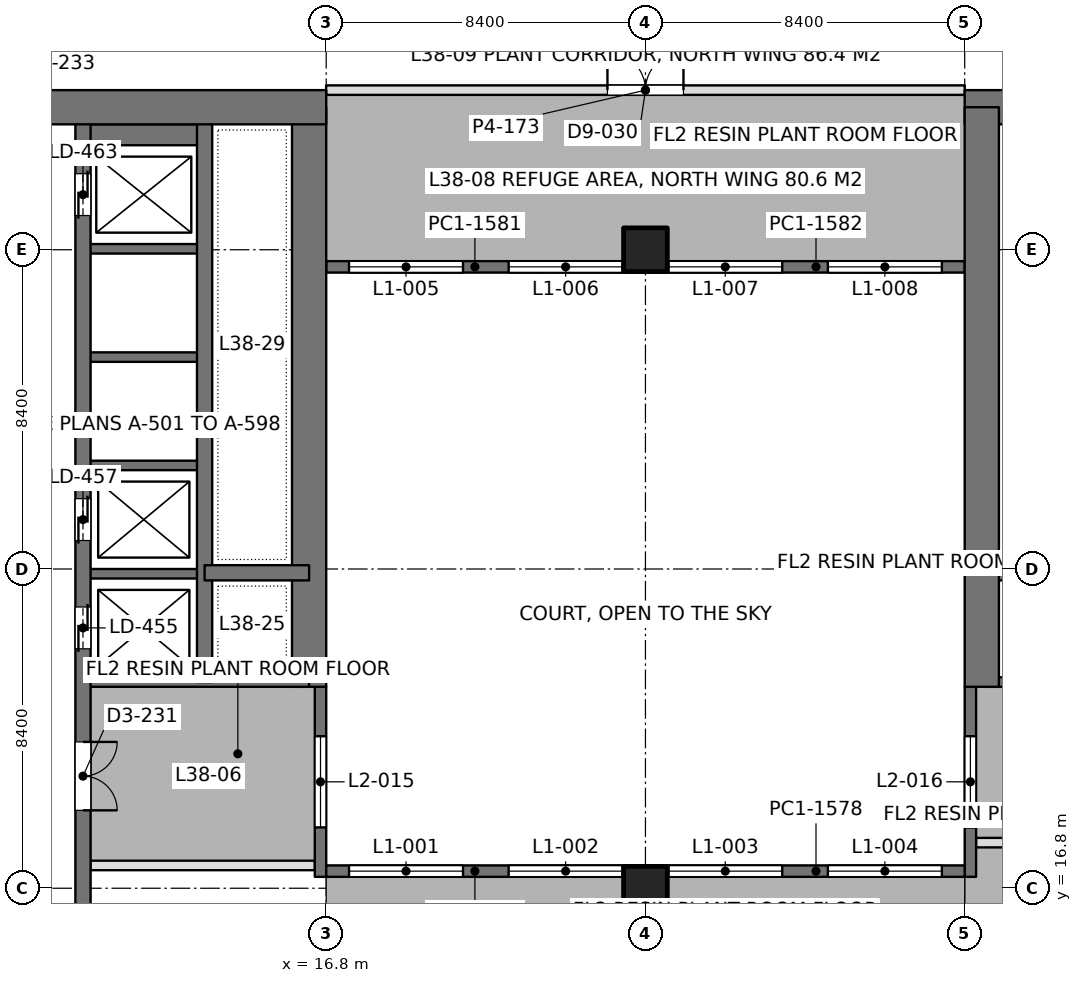
"""IFC4 building model, lengths in metres.
Left out: names, types, materials, properties, quantities, classifications, styles, units other than length and angle.
Written with IfcOpenShell. Run it as: python <this file> out.ifc"""

import sys

from ifc_helpers import new_model, si_unit, direction, frame, frame_2d, origin, origin_2d, place, context, subcontext, project, spatial, rectangle, extrude, element, fill, save


model = new_model("IFC4")
c1 = context("Model", 3, precision=1e-05, world=origin(), true_north=direction((0.0, 1.0)))
c2 = subcontext(c1, "Body", "Model", "MODEL_VIEW")
j1 = project(units=[si_unit("LENGTHUNIT", "METRE"), si_unit("PLANEANGLEUNIT", "RADIAN")], contexts=[c1])
p1 = place(None, origin())
s1 = spatial("IfcSite", under=j1, at=p1, CompositionType="ELEMENT")
p2 = place(p1, origin())
s2 = spatial("IfcBuilding", under=s1, at=p2, CompositionType="ELEMENT")
p3 = place(p2, frame((0.0, 0.0, 168.0)))
s3 = spatial("IfcBuildingStorey", under=s2, at=p3, CompositionType="ELEMENT", Elevation=168.0)
for number, where, z_axis, x_axis in (
    (1, (25.2, 16.8, 0.0), (0.0, 0.0, 1.0), (1.0, 0.0, 0.0)),
    (2, (25.2, 33.6, 0.0), (0.0, 0.0, 1.0), (1.0, 0.0, 0.0)),
):
    element("IfcColumn", number, at=place(p3, frame(where, z_axis=z_axis, x_axis=x_axis)), inside=s3, PredefinedType="COLUMN", context=c2, shape_type="SweptSolid", body=[
        extrude(rectangle(XDim=1.15, YDim=1.15, at=origin_2d()), origin(), (0.0, 0.0, 1.0), 5.4),
    ])
p4 = place(p3, frame((-1.2, 37.35, 0.0), z_axis=(0.0, 0.0, 1.0), x_axis=(1.0, 0.0, 0.0)))
e3 = element("IfcWall", 3, at=p4, inside=s3, PredefinedType="SHEAR", context=c2, shape_type="SweptSolid", body=[
    extrude(rectangle(XDim=18.0, YDim=0.9, at=frame_2d((9.0, 0.0))), origin(), (0.0, 0.0, 1.0), 5.4),
])
p5 = place(p4, frame((8.95, 0.0, 0.0)))
e4 = element("IfcOpeningElement", 4, at=p5, cuts=e3, PredefinedType="OPENING", context=c2, shape_type="SweptSolid", body=[
    extrude(rectangle(XDim=1.8, YDim=2.4, at=frame_2d((0.9, 1.2))), frame((0.0, 0.46, 0.0), z_axis=(0.0, -1.0, 0.0), x_axis=(1.0, 0.0, 0.0)), (0.0, 0.0, 1.0), 0.92),
])
p6 = place(p3, frame((16.35, 22.1, 0.0), z_axis=(0.0, 0.0, 1.0), x_axis=(0.0, 1.0, 0.0)))
e5 = element("IfcWall", 5, at=p6, inside=s3, PredefinedType="SHEAR", context=c2, shape_type="SweptSolid", body=[
    extrude(rectangle(XDim=15.25, YDim=0.9, at=frame_2d((7.625, 0.0))), origin(), (0.0, 0.0, 1.0), 5.4),
])
p7 = place(p3, frame((10.4, 13.05, 0.0), z_axis=(0.0, 0.0, 1.0), x_axis=(0.0, 1.0, 0.0)))
e6 = element("IfcWall", 6, at=p7, inside=s3, PredefinedType="SHEAR", context=c2, shape_type="SweptSolid", body=[
    extrude(rectangle(XDim=24.3, YDim=0.4, at=frame_2d((12.15, 0.0))), origin(), (0.0, 0.0, 1.0), 5.4),
])
p8 = place(p7, frame((10.05, 0.0, 0.0)))
e7 = element("IfcOpeningElement", 7, at=p8, cuts=e6, PredefinedType="OPENING", context=c2, shape_type="SweptSolid", body=[
    extrude(rectangle(XDim=1.1, YDim=2.2, at=frame_2d((0.55, 1.1))), frame((0.0, 0.21, 0.0), z_axis=(0.0, -1.0, 0.0), x_axis=(1.0, 0.0, 0.0)), (0.0, 0.0, 1.0), 0.42),
])
p9 = place(p7, frame((12.9, 0.0, 0.0)))
e8 = element("IfcOpeningElement", 8, at=p9, cuts=e6, PredefinedType="OPENING", context=c2, shape_type="SweptSolid", body=[
    extrude(rectangle(XDim=1.1, YDim=2.2, at=frame_2d((0.55, 1.1))), frame((0.0, 0.21, 0.0), z_axis=(0.0, -1.0, 0.0), x_axis=(1.0, 0.0, 0.0)), (0.0, 0.0, 1.0), 0.42),
])
p10 = place(p7, frame((21.45, 0.0, 0.0)))
e9 = element("IfcOpeningElement", 9, at=p10, cuts=e6, PredefinedType="OPENING", context=c2, shape_type="SweptSolid", body=[
    extrude(rectangle(XDim=1.1, YDim=2.2, at=frame_2d((0.55, 1.1))), frame((0.0, 0.21, 0.0), z_axis=(0.0, -1.0, 0.0), x_axis=(1.0, 0.0, 0.0)), (0.0, 0.0, 1.0), 0.42),
])
p11 = place(p7, frame((5.8, 0.0, 0.0)))
e10 = element("IfcOpeningElement", 10, at=p11, cuts=e6, PredefinedType="OPENING", context=c2, shape_type="SweptSolid", body=[
    extrude(rectangle(XDim=1.8, YDim=2.4, at=frame_2d((0.9, 1.2))), frame((0.0, 0.21, 0.0), z_axis=(0.0, -1.0, 0.0), x_axis=(1.0, 0.0, 0.0)), (0.0, 0.0, 1.0), 0.42),
])
p12 = place(p7, frame((1.05, 0.0, 0.0)))
e11 = element("IfcOpeningElement", 11, at=p12, cuts=e6, PredefinedType="OPENING", context=c2, shape_type="SweptSolid", body=[
    extrude(rectangle(XDim=1.8, YDim=2.4, at=frame_2d((0.9, 1.2))), frame((0.0, 0.21, 0.0), z_axis=(0.0, -1.0, 0.0), x_axis=(1.0, 0.0, 0.0)), (0.0, 0.0, 1.0), 0.42),
])
p13 = place(p3, frame((13.6, 22.225, 0.0), z_axis=(0.0, 0.0, 1.0), x_axis=(0.0, 1.0, 0.0)))
e12 = element("IfcWall", 12, at=p13, inside=s3, PredefinedType="SHEAR", context=c2, shape_type="SweptSolid", body=[
    extrude(rectangle(XDim=15.125, YDim=0.4, at=frame_2d((7.562, 0.0))), origin(), (0.0, 0.0, 1.0), 5.4),
])
p14 = place(p3, frame((13.6, 25.1, 0.0), z_axis=(0.0, 0.0, 1.0), x_axis=(1.0, 0.0, 0.0)))
e13 = element("IfcWall", 13, at=p14, inside=s3, PredefinedType="SHEAR", context=c2, shape_type="SweptSolid", body=[
    extrude(rectangle(XDim=2.75, YDim=0.4, at=frame_2d((1.375, 0.0))), origin(), (0.0, 0.0, 1.0), 5.4),
])
p15 = place(p3, frame((10.4, 22.225, 0.0), z_axis=(0.0, 0.0, 1.0), x_axis=(1.0, 0.0, 0.0)))
e14 = element("IfcWall", 14, at=p15, inside=s3, PredefinedType="SHEAR", context=c2, shape_type="SweptSolid", body=[
    extrude(rectangle(XDim=5.95, YDim=0.25, at=frame_2d((2.975, 0.0))), origin(), (0.0, 0.0, 1.0), 5.4),
])
for number, where, z_axis, x_axis in (
    (15, (10.4, 25.075, 0.0), (0.0, 0.0, 1.0), (1.0, 0.0, 0.0)),
    (16, (10.4, 27.925, 0.0), (0.0, 0.0, 1.0), (1.0, 0.0, 0.0)),
    (17, (10.4, 30.775, 0.0), (0.0, 0.0, 1.0), (1.0, 0.0, 0.0)),
    (18, (10.4, 33.625, 0.0), (0.0, 0.0, 1.0), (1.0, 0.0, 0.0)),
):
    element("IfcWall", number, at=place(p3, frame(where, z_axis=z_axis, x_axis=x_axis)), inside=s3, PredefinedType="SHEAR", context=c2, shape_type="SweptSolid", body=[
        extrude(rectangle(XDim=3.2, YDim=0.25, at=frame_2d((1.6, 0.0))), origin(), (0.0, 0.0, 1.0), 5.4),
    ])
p16 = place(p3, frame((10.4, 36.625, 0.0), z_axis=(0.0, 0.0, 1.0), x_axis=(1.0, 0.0, 0.0)))
e19 = element("IfcWall", 19, at=p16, inside=s3, PredefinedType="SHEAR", context=c2, shape_type="SweptSolid", body=[
    extrude(rectangle(XDim=3.2, YDim=0.55, at=frame_2d((1.6, 0.0))), origin(), (0.0, 0.0, 1.0), 5.4),
])
p17 = place(p3, frame((33.6, 37.35, 0.0), z_axis=(0.0, 0.0, 1.0), x_axis=(1.0, 0.0, 0.0)))
e20 = element("IfcWall", 20, at=p17, inside=s3, PredefinedType="SHEAR", context=c2, shape_type="SweptSolid", body=[
    extrude(rectangle(XDim=18.0, YDim=0.9, at=frame_2d((9.0, 0.0))), origin(), (0.0, 0.0, 1.0), 5.4),
])
p18 = place(p17, frame((7.25, 0.0, 0.0)))
e21 = element("IfcOpeningElement", 21, at=p18, cuts=e20, PredefinedType="OPENING", context=c2, shape_type="SweptSolid", body=[
    extrude(rectangle(XDim=1.8, YDim=2.4, at=frame_2d((0.9, 1.2))), frame((0.0, 0.46, 0.0), z_axis=(0.0, -1.0, 0.0), x_axis=(1.0, 0.0, 0.0)), (0.0, 0.0, 1.0), 0.92),
])
p19 = place(p3, frame((34.05, 22.1, 0.0), z_axis=(0.0, 0.0, 1.0), x_axis=(0.0, 1.0, 0.0)))
e22 = element("IfcWall", 22, at=p19, inside=s3, PredefinedType="SHEAR", context=c2, shape_type="SweptSolid", body=[
    extrude(rectangle(XDim=15.25, YDim=0.9, at=frame_2d((7.625, 0.0))), origin(), (0.0, 0.0, 1.0), 5.4),
])
p20 = place(p3, frame((36.8, 25.1, 0.0), z_axis=(0.0, 0.0, 1.0), x_axis=(-1.0, 0.0, 0.0)))
e23 = element("IfcWall", 23, at=p20, inside=s3, PredefinedType="SHEAR", context=c2, shape_type="SweptSolid", body=[
    extrude(rectangle(XDim=2.75, YDim=0.4, at=frame_2d((1.375, 0.0))), origin(), (0.0, 0.0, 1.0), 5.4),
])
p21 = place(p3, frame((40.0, 22.225, 0.0), z_axis=(0.0, 0.0, 1.0), x_axis=(-1.0, 0.0, 0.0)))
e24 = element("IfcWall", 24, at=p21, inside=s3, PredefinedType="SHEAR", context=c2, shape_type="SweptSolid", body=[
    extrude(rectangle(XDim=5.95, YDim=0.25, at=frame_2d((2.975, 0.0))), origin(), (0.0, 0.0, 1.0), 5.4),
])
p22 = place(p3, frame((16.65, 17.1, 0.0), z_axis=(0.0, 0.0, 1.0), x_axis=(0.0, 1.0, 0.0)))
e25 = element("IfcWall", 25, at=p22, inside=s3, PredefinedType="SOLIDWALL", context=c2, shape_type="SweptSolid", body=[
    extrude(rectangle(XDim=5.0, YDim=0.3, at=frame_2d((2.5, 0.0))), origin(), (0.0, 0.0, 1.0), 5.25),
])
p23 = place(p22, frame((1.3, 0.0, 1.2)))
e26 = element("IfcOpeningElement", 26, at=p23, cuts=e25, PredefinedType="OPENING", context=c2, shape_type="SweptSolid", body=[
    extrude(rectangle(XDim=2.4, YDim=2.4, at=frame_2d((1.2, 1.2))), frame((0.0, 0.16, 0.0), z_axis=(0.0, -1.0, 0.0), x_axis=(1.0, 0.0, 0.0)), (0.0, 0.0, 1.0), 0.32),
])
p24 = place(p3, frame((33.75, 17.1, 0.0), z_axis=(0.0, 0.0, 1.0), x_axis=(0.0, 1.0, 0.0)))
e27 = element("IfcWall", 27, at=p24, inside=s3, PredefinedType="SOLIDWALL", context=c2, shape_type="SweptSolid", body=[
    extrude(rectangle(XDim=5.0, YDim=0.3, at=frame_2d((2.5, 0.0))), origin(), (0.0, 0.0, 1.0), 5.25),
])
p25 = place(p24, frame((1.3, 0.0, 1.2)))
e28 = element("IfcOpeningElement", 28, at=p25, cuts=e27, PredefinedType="OPENING", context=c2, shape_type="SweptSolid", body=[
    extrude(rectangle(XDim=2.4, YDim=2.4, at=frame_2d((1.2, 1.2))), frame((0.0, 0.16, 0.0), z_axis=(0.0, -1.0, 0.0), x_axis=(1.0, 0.0, 0.0)), (0.0, 0.0, 1.0), 0.32),
])
p26 = place(p3, frame((16.8, 17.25, 0.0), z_axis=(0.0, 0.0, 1.0), x_axis=(1.0, 0.0, 0.0)))
e29 = element("IfcWall", 29, at=p26, inside=s3, PredefinedType="SOLIDWALL", context=c2, shape_type="SweptSolid", body=[
    extrude(rectangle(XDim=7.825, YDim=0.3, at=frame_2d((3.913, 0.0))), origin(), (0.0, 0.0, 1.0), 5.25),
])
p27 = place(p26, frame((0.6, 0.0, 1.2)))
e30 = element("IfcOpeningElement", 30, at=p27, cuts=e29, PredefinedType="OPENING", context=c2, shape_type="SweptSolid", body=[
    extrude(rectangle(XDim=3.0, YDim=2.4, at=frame_2d((1.5, 1.2))), frame((0.0, 0.16, 0.0), z_axis=(0.0, -1.0, 0.0), x_axis=(1.0, 0.0, 0.0)), (0.0, 0.0, 1.0), 0.32),
])
p28 = place(p26, frame((4.8, 0.0, 1.2)))
e31 = element("IfcOpeningElement", 31, at=p28, cuts=e29, PredefinedType="OPENING", context=c2, shape_type="SweptSolid", body=[
    extrude(rectangle(XDim=3.0, YDim=2.4, at=frame_2d((1.5, 1.2))), frame((0.0, 0.16, 0.0), z_axis=(0.0, -1.0, 0.0), x_axis=(1.0, 0.0, 0.0)), (0.0, 0.0, 1.0), 0.32),
])
p29 = place(p3, frame((25.775, 17.25, 0.0), z_axis=(0.0, 0.0, 1.0), x_axis=(1.0, 0.0, 0.0)))
e32 = element("IfcWall", 32, at=p29, inside=s3, PredefinedType="SOLIDWALL", context=c2, shape_type="SweptSolid", body=[
    extrude(rectangle(XDim=7.825, YDim=0.3, at=frame_2d((3.913, 0.0))), origin(), (0.0, 0.0, 1.0), 5.25),
])
p30 = place(p29, frame((0.025, 0.0, 1.2)))
e33 = element("IfcOpeningElement", 33, at=p30, cuts=e32, PredefinedType="OPENING", context=c2, shape_type="SweptSolid", body=[
    extrude(rectangle(XDim=3.0, YDim=2.4, at=frame_2d((1.5, 1.2))), frame((0.0, 0.16, 0.0), z_axis=(0.0, -1.0, 0.0), x_axis=(1.0, 0.0, 0.0)), (0.0, 0.0, 1.0), 0.32),
])
p31 = place(p29, frame((4.225, 0.0, 1.2)))
e34 = element("IfcOpeningElement", 34, at=p31, cuts=e32, PredefinedType="OPENING", context=c2, shape_type="SweptSolid", body=[
    extrude(rectangle(XDim=3.0, YDim=2.4, at=frame_2d((1.5, 1.2))), frame((0.0, 0.16, 0.0), z_axis=(0.0, -1.0, 0.0), x_axis=(1.0, 0.0, 0.0)), (0.0, 0.0, 1.0), 0.32),
])
p32 = place(p3, frame((16.8, 33.15, 0.0), z_axis=(0.0, 0.0, 1.0), x_axis=(1.0, 0.0, 0.0)))
e35 = element("IfcWall", 35, at=p32, inside=s3, PredefinedType="SOLIDWALL", context=c2, shape_type="SweptSolid", body=[
    extrude(rectangle(XDim=7.825, YDim=0.3, at=frame_2d((3.913, 0.0))), origin(), (0.0, 0.0, 1.0), 5.25),
])
p33 = place(p32, frame((0.6, 0.0, 1.2)))
e36 = element("IfcOpeningElement", 36, at=p33, cuts=e35, PredefinedType="OPENING", context=c2, shape_type="SweptSolid", body=[
    extrude(rectangle(XDim=3.0, YDim=2.4, at=frame_2d((1.5, 1.2))), frame((0.0, 0.16, 0.0), z_axis=(0.0, -1.0, 0.0), x_axis=(1.0, 0.0, 0.0)), (0.0, 0.0, 1.0), 0.32),
])
p34 = place(p32, frame((4.8, 0.0, 1.2)))
e37 = element("IfcOpeningElement", 37, at=p34, cuts=e35, PredefinedType="OPENING", context=c2, shape_type="SweptSolid", body=[
    extrude(rectangle(XDim=3.0, YDim=2.4, at=frame_2d((1.5, 1.2))), frame((0.0, 0.16, 0.0), z_axis=(0.0, -1.0, 0.0), x_axis=(1.0, 0.0, 0.0)), (0.0, 0.0, 1.0), 0.32),
])
p35 = place(p3, frame((25.775, 33.15, 0.0), z_axis=(0.0, 0.0, 1.0), x_axis=(1.0, 0.0, 0.0)))
e38 = element("IfcWall", 38, at=p35, inside=s3, PredefinedType="SOLIDWALL", context=c2, shape_type="SweptSolid", body=[
    extrude(rectangle(XDim=7.825, YDim=0.3, at=frame_2d((3.913, 0.0))), origin(), (0.0, 0.0, 1.0), 5.25),
])
p36 = place(p35, frame((0.025, 0.0, 1.2)))
e39 = element("IfcOpeningElement", 39, at=p36, cuts=e38, PredefinedType="OPENING", context=c2, shape_type="SweptSolid", body=[
    extrude(rectangle(XDim=3.0, YDim=2.4, at=frame_2d((1.5, 1.2))), frame((0.0, 0.16, 0.0), z_axis=(0.0, -1.0, 0.0), x_axis=(1.0, 0.0, 0.0)), (0.0, 0.0, 1.0), 0.32),
])
p37 = place(p35, frame((4.225, 0.0, 1.2)))
e40 = element("IfcOpeningElement", 40, at=p37, cuts=e38, PredefinedType="OPENING", context=c2, shape_type="SweptSolid", body=[
    extrude(rectangle(XDim=3.0, YDim=2.4, at=frame_2d((1.5, 1.2))), frame((0.0, 0.16, 0.0), z_axis=(0.0, -1.0, 0.0), x_axis=(1.0, 0.0, 0.0)), (0.0, 0.0, 1.0), 0.32),
])
for number, where, z_axis, x_axis in (
    (41, (10.598, 17.4, 0.0), (0.0, 0.0, 1.0), (1.0, 0.0, 0.0)),
    (42, (33.898, 18.0, 0.0), (0.0, 0.0, 1.0), (1.0, 0.0, 0.0)),
):
    element("IfcWall", number, at=place(p3, frame(where, z_axis=z_axis, x_axis=x_axis)), inside=s3, PredefinedType="PARTITIONING", context=c2, shape_type="SweptSolid", body=[
        extrude(rectangle(XDim=5.904, YDim=0.25, at=frame_2d((2.952, 0.0))), origin(), (0.0, 0.0, 1.0), 4.75),
    ])
p38 = place(p3, frame((16.798, 37.8, 0.0), z_axis=(0.0, 0.0, 1.0), x_axis=(1.0, 0.0, 0.0)))
e43 = element("IfcWall", 43, at=p38, inside=s3, PredefinedType="PARTITIONING", context=c2, shape_type="SweptSolid", body=[
    extrude(rectangle(XDim=16.804, YDim=0.25, at=frame_2d((8.402, 0.0))), origin(), (0.0, 0.0, 1.0), 4.725),
])
p39 = place(p38, frame((7.402, 0.0, 0.0)))
e44 = element("IfcOpeningElement", 44, at=p39, cuts=e43, PredefinedType="OPENING", context=c2, shape_type="SweptSolid", body=[
    extrude(rectangle(XDim=2.0, YDim=2.4, at=frame_2d((1.0, 1.2))), frame((0.0, 0.135, 0.0), z_axis=(0.0, -1.0, 0.0), x_axis=(1.0, 0.0, 0.0)), (0.0, 0.0, 1.0), 0.27),
])
p40 = place(p23, origin())
e45 = element("IfcWindow", 45, at=p40, inside=s3, PartitioningType="SINGLE_PANEL", PredefinedType="USERDEFINED", context=c2, shape_type="SweptSolid", body=[
    extrude(rectangle(XDim=2.4, YDim=2.4, at=frame_2d((1.2, 1.2))), frame((0.0, 0.03, 0.0), z_axis=(0.0, -1.0, 0.0), x_axis=(1.0, 0.0, 0.0)), (0.0, 0.0, 1.0), 0.06),
])
fill(e26, e45)
p41 = place(p25, origin())
e46 = element("IfcWindow", 46, at=p41, inside=s3, PartitioningType="SINGLE_PANEL", PredefinedType="USERDEFINED", context=c2, shape_type="SweptSolid", body=[
    extrude(rectangle(XDim=2.4, YDim=2.4, at=frame_2d((1.2, 1.2))), frame((0.0, 0.03, 0.0), z_axis=(0.0, -1.0, 0.0), x_axis=(1.0, 0.0, 0.0)), (0.0, 0.0, 1.0), 0.06),
])
fill(e28, e46)
p42 = place(p27, origin())
e47 = element("IfcWindow", 47, at=p42, inside=s3, PartitioningType="SINGLE_PANEL", PredefinedType="USERDEFINED", context=c2, shape_type="SweptSolid", body=[
    extrude(rectangle(XDim=3.0, YDim=2.4, at=frame_2d((1.5, 1.2))), frame((0.0, 0.03, 0.0), z_axis=(0.0, -1.0, 0.0), x_axis=(1.0, 0.0, 0.0)), (0.0, 0.0, 1.0), 0.06),
])
fill(e30, e47)
p43 = place(p28, origin())
e48 = element("IfcWindow", 48, at=p43, inside=s3, PartitioningType="SINGLE_PANEL", PredefinedType="USERDEFINED", context=c2, shape_type="SweptSolid", body=[
    extrude(rectangle(XDim=3.0, YDim=2.4, at=frame_2d((1.5, 1.2))), frame((0.0, 0.03, 0.0), z_axis=(0.0, -1.0, 0.0), x_axis=(1.0, 0.0, 0.0)), (0.0, 0.0, 1.0), 0.06),
])
fill(e31, e48)
p44 = place(p30, origin())
e49 = element("IfcWindow", 49, at=p44, inside=s3, PartitioningType="SINGLE_PANEL", PredefinedType="USERDEFINED", context=c2, shape_type="SweptSolid", body=[
    extrude(rectangle(XDim=3.0, YDim=2.4, at=frame_2d((1.5, 1.2))), frame((0.0, 0.03, 0.0), z_axis=(0.0, -1.0, 0.0), x_axis=(1.0, 0.0, 0.0)), (0.0, 0.0, 1.0), 0.06),
])
fill(e33, e49)
p45 = place(p31, origin())
e50 = element("IfcWindow", 50, at=p45, inside=s3, PartitioningType="SINGLE_PANEL", PredefinedType="USERDEFINED", context=c2, shape_type="SweptSolid", body=[
    extrude(rectangle(XDim=3.0, YDim=2.4, at=frame_2d((1.5, 1.2))), frame((0.0, 0.03, 0.0), z_axis=(0.0, -1.0, 0.0), x_axis=(1.0, 0.0, 0.0)), (0.0, 0.0, 1.0), 0.06),
])
fill(e34, e50)
p46 = place(p33, origin())
e51 = element("IfcWindow", 51, at=p46, inside=s3, PartitioningType="SINGLE_PANEL", PredefinedType="USERDEFINED", context=c2, shape_type="SweptSolid", body=[
    extrude(rectangle(XDim=3.0, YDim=2.4, at=frame_2d((1.5, 1.2))), frame((0.0, 0.03, 0.0), z_axis=(0.0, -1.0, 0.0), x_axis=(1.0, 0.0, 0.0)), (0.0, 0.0, 1.0), 0.06),
])
fill(e36, e51)
p47 = place(p34, origin())
e52 = element("IfcWindow", 52, at=p47, inside=s3, PartitioningType="SINGLE_PANEL", PredefinedType="USERDEFINED", context=c2, shape_type="SweptSolid", body=[
    extrude(rectangle(XDim=3.0, YDim=2.4, at=frame_2d((1.5, 1.2))), frame((0.0, 0.03, 0.0), z_axis=(0.0, -1.0, 0.0), x_axis=(1.0, 0.0, 0.0)), (0.0, 0.0, 1.0), 0.06),
])
fill(e37, e52)
p48 = place(p36, origin())
e53 = element("IfcWindow", 53, at=p48, inside=s3, PartitioningType="SINGLE_PANEL", PredefinedType="USERDEFINED", context=c2, shape_type="SweptSolid", body=[
    extrude(rectangle(XDim=3.0, YDim=2.4, at=frame_2d((1.5, 1.2))), frame((0.0, 0.03, 0.0), z_axis=(0.0, -1.0, 0.0), x_axis=(1.0, 0.0, 0.0)), (0.0, 0.0, 1.0), 0.06),
])
fill(e39, e53)
p49 = place(p37, origin())
e54 = element("IfcWindow", 54, at=p49, inside=s3, PartitioningType="SINGLE_PANEL", PredefinedType="USERDEFINED", context=c2, shape_type="SweptSolid", body=[
    extrude(rectangle(XDim=3.0, YDim=2.4, at=frame_2d((1.5, 1.2))), frame((0.0, 0.03, 0.0), z_axis=(0.0, -1.0, 0.0), x_axis=(1.0, 0.0, 0.0)), (0.0, 0.0, 1.0), 0.06),
])
fill(e40, e54)
p50 = place(p8, origin())
e55 = element("IfcDoor", 55, at=p50, inside=s3, OperationType="DOUBLE_DOOR_SLIDING", PredefinedType="DOOR", context=c2, shape_type="SweptSolid", body=[
    extrude(rectangle(XDim=1.1, YDim=2.2, at=frame_2d((0.55, 1.1))), frame((0.0, 0.025, 0.0), z_axis=(0.0, -1.0, 0.0), x_axis=(1.0, 0.0, 0.0)), (0.0, 0.0, 1.0), 0.05),
])
fill(e7, e55)
p51 = place(p9, origin())
e56 = element("IfcDoor", 56, at=p51, inside=s3, OperationType="DOUBLE_DOOR_SLIDING", PredefinedType="DOOR", context=c2, shape_type="SweptSolid", body=[
    extrude(rectangle(XDim=1.1, YDim=2.2, at=frame_2d((0.55, 1.1))), frame((0.0, 0.025, 0.0), z_axis=(0.0, -1.0, 0.0), x_axis=(1.0, 0.0, 0.0)), (0.0, 0.0, 1.0), 0.05),
])
fill(e8, e56)
p52 = place(p10, origin())
e57 = element("IfcDoor", 57, at=p52, inside=s3, OperationType="DOUBLE_DOOR_SLIDING", PredefinedType="DOOR", context=c2, shape_type="SweptSolid", body=[
    extrude(rectangle(XDim=1.1, YDim=2.2, at=frame_2d((0.55, 1.1))), frame((0.0, 0.025, 0.0), z_axis=(0.0, -1.0, 0.0), x_axis=(1.0, 0.0, 0.0)), (0.0, 0.0, 1.0), 0.05),
])
fill(e9, e57)
p53 = place(p11, frame((1.8, 0.0, 0.0), z_axis=(0.0, 0.0, 1.0), x_axis=(-1.0, 0.0, 0.0)))
e58 = element("IfcDoor", 58, at=p53, inside=s3, OperationType="DOUBLE_DOOR_SINGLE_SWING", PredefinedType="DOOR", context=c2, shape_type="SweptSolid", body=[
    extrude(rectangle(XDim=1.8, YDim=2.4, at=frame_2d((0.9, 1.2))), frame((0.0, 0.025, 0.0), z_axis=(0.0, -1.0, 0.0), x_axis=(1.0, 0.0, 0.0)), (0.0, 0.0, 1.0), 0.05),
])
fill(e10, e58)
p54 = place(p39, origin())
e59 = element("IfcDoor", 59, at=p54, inside=s3, OperationType="DOUBLE_DOOR_SINGLE_SWING", PredefinedType="DOOR", context=c2, shape_type="SweptSolid", body=[
    extrude(rectangle(XDim=2.0, YDim=2.4, at=frame_2d((1.0, 1.2))), frame((0.0, 0.025, 0.0), z_axis=(0.0, -1.0, 0.0), x_axis=(1.0, 0.0, 0.0)), (0.0, 0.0, 1.0), 0.05),
])
fill(e44, e59)
save(model, sys.argv[1])
